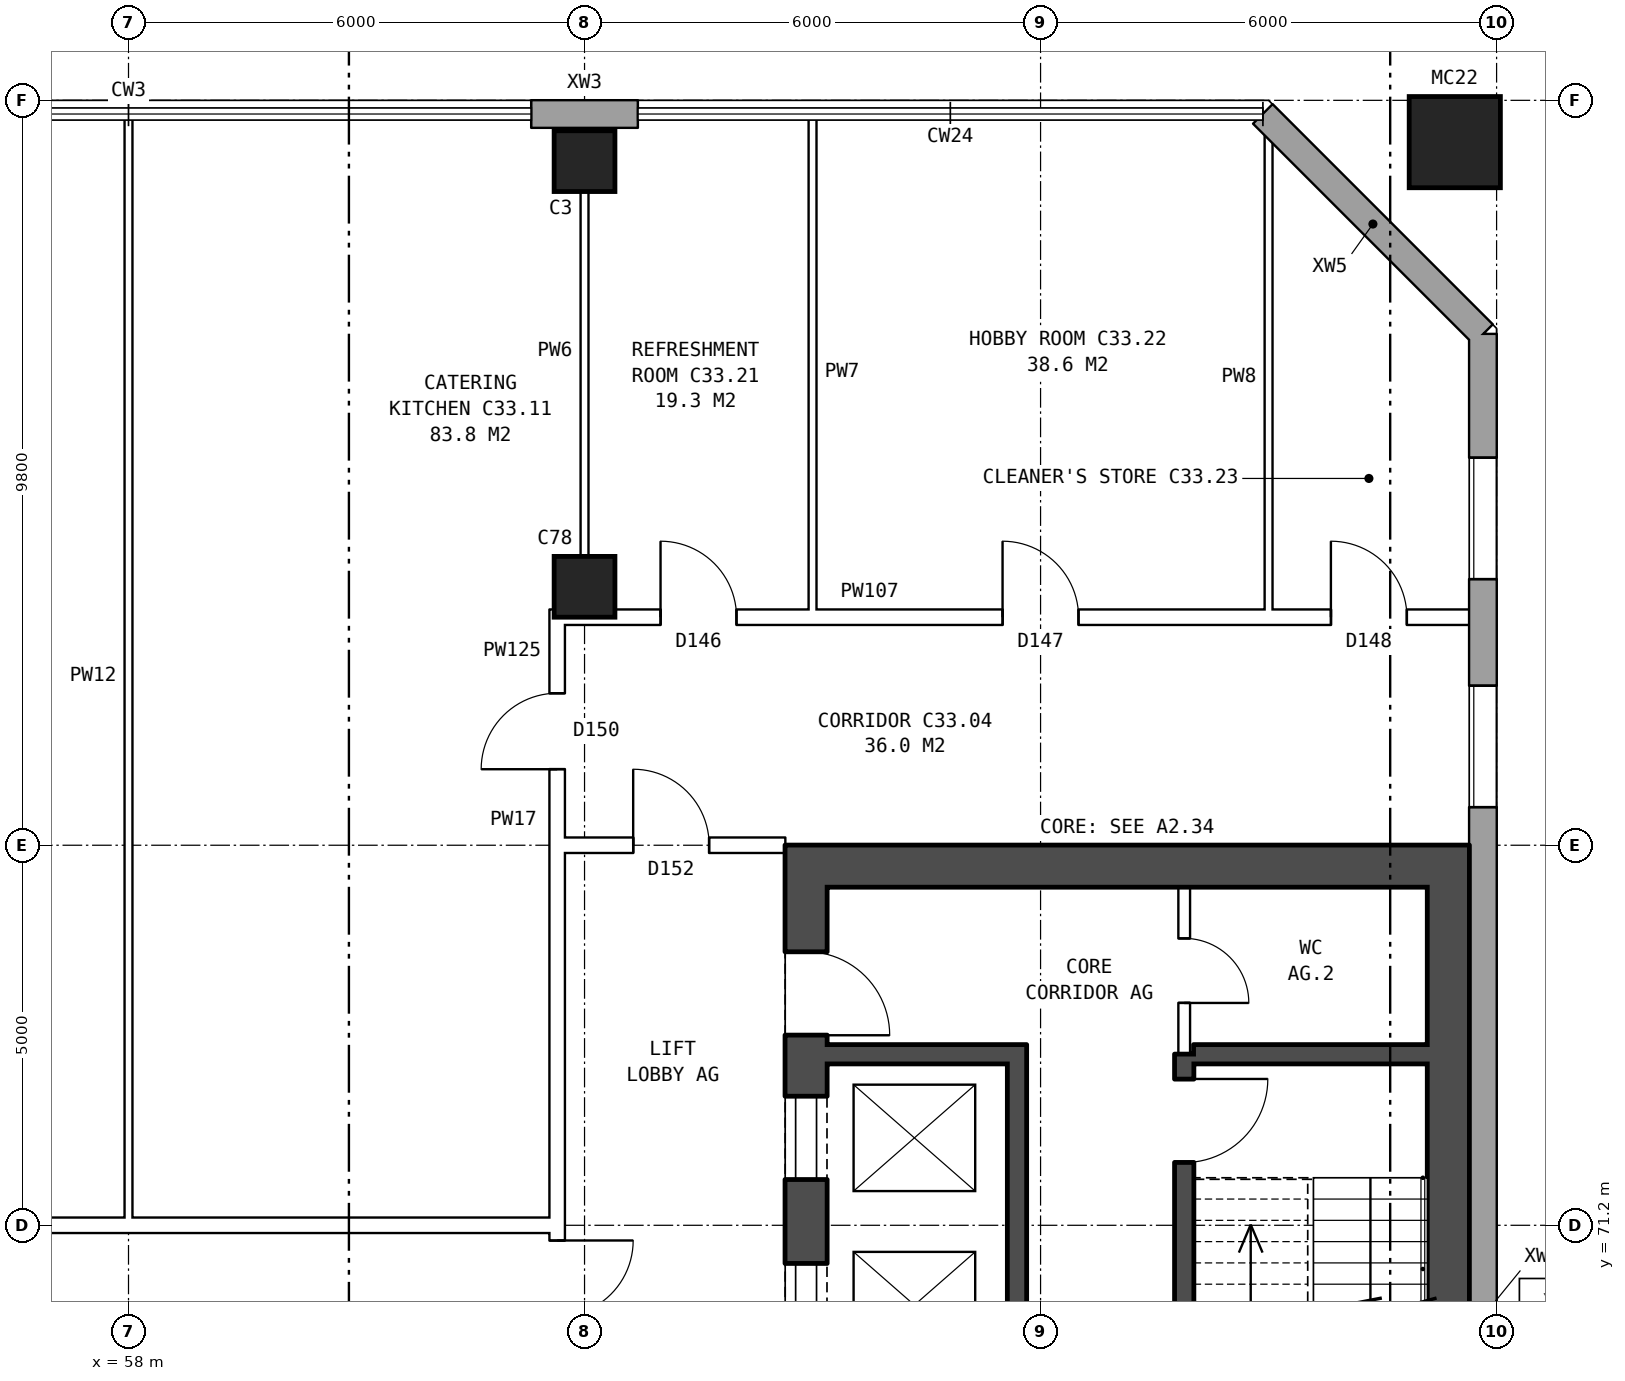
"""IFC4 building model, lengths in metres.
Left out: names, types, materials, properties, quantities, classifications, styles, units other than length and angle.
Written with IfcOpenShell. Run it as: python <this file> out.ifc"""

import sys

from ifc_helpers import new_model, si_unit, direction, frame, frame_2d, origin, origin_2d, place, context, subcontext, project, spatial, rectangle, hollow_rectangle, extrude, element, fill, save


model = new_model("IFC4")
c1 = context("Model", 3, precision=1e-05, world=origin(), true_north=direction((0.0, 1.0)))
c2 = subcontext(c1, "Body", "Model", "MODEL_VIEW")
j1 = project(units=[si_unit("LENGTHUNIT", "METRE"), si_unit("PLANEANGLEUNIT", "RADIAN")], contexts=[c1])
p1 = place(None, origin())
s1 = spatial("IfcSite", under=j1, at=p1, CompositionType="ELEMENT")
p2 = place(p1, origin())
s2 = spatial("IfcBuilding", under=s1, at=p2, CompositionType="ELEMENT")
p3 = place(p2, frame((0.0, 0.0, 119.5)))
s3 = spatial("IfcBuildingStorey", under=s2, at=p3, CompositionType="ELEMENT", Elevation=119.5)
for number, where, z_axis, x_axis in (
    (1, (64.0, 79.6, 0.0), (0.0, 0.0, 1.0), (1.0, 0.0, 0.0)),
    (2, (64.0, 85.2, 0.0), (0.0, 0.0, 1.0), (1.0, 0.0, 0.0)),
):
    element("IfcColumn", number, at=place(p3, frame(where, z_axis=z_axis, x_axis=x_axis)), inside=s3, PredefinedType="COLUMN", context=c2, shape_type="SweptSolid", body=[
        extrude(rectangle(XDim=0.8, YDim=0.8, at=origin_2d()), origin(), (0.0, 0.0, 1.0), 3.6),
    ])
p4 = place(p3, frame((75.45, 85.45, 0.0), z_axis=(0.0, 0.0, 1.0), x_axis=(1.0, 0.0, 0.0)))
e3 = element("IfcColumn", 3, at=p4, inside=s3, PredefinedType="COLUMN", context=c2, shape_type="SweptSolid", body=[
    extrude(hollow_rectangle(XDim=1.2, YDim=1.2, WallThickness=0.065, at=origin_2d()), origin(), (0.0, 0.0, 1.0), 4.2),
])
p5 = place(p3, frame((75.82, 57.075, 0.0), z_axis=(0.0, 0.0, 1.0), x_axis=(0.0, 1.0, 0.0)))
e4 = element("IfcWall", 4, at=p5, inside=s3, PredefinedType="STANDARD", context=c2, shape_type="SweptSolid", body=[
    extrude(rectangle(XDim=25.851, YDim=0.36, at=frame_2d((12.925, 0.0))), origin(), (0.0, 0.0, 1.0), 3.6),
])
p6 = place(p5, frame((1.625, 0.0, 0.8)))
e5 = element("IfcOpeningElement", 5, at=p6, cuts=e4, PredefinedType="OPENING", context=c2, shape_type="SweptSolid", body=[
    extrude(rectangle(XDim=1.6, YDim=1.8, at=frame_2d((0.8, 0.9))), frame((0.0, 0.19, 0.0), z_axis=(0.0, -1.0, 0.0), x_axis=(1.0, 0.0, 0.0)), (0.0, 0.0, 1.0), 0.38),
])
p7 = place(p5, frame((4.625, 0.0, 0.8)))
e6 = element("IfcOpeningElement", 6, at=p7, cuts=e4, PredefinedType="OPENING", context=c2, shape_type="SweptSolid", body=[
    extrude(rectangle(XDim=1.6, YDim=1.8, at=frame_2d((0.8, 0.9))), frame((0.0, 0.19, 0.0), z_axis=(0.0, -1.0, 0.0), x_axis=(1.0, 0.0, 0.0)), (0.0, 0.0, 1.0), 0.38),
])
p8 = place(p5, frame((19.625, 0.0, 0.8)))
e7 = element("IfcOpeningElement", 7, at=p8, cuts=e4, PredefinedType="OPENING", context=c2, shape_type="SweptSolid", body=[
    extrude(rectangle(XDim=1.6, YDim=1.8, at=frame_2d((0.8, 0.9))), frame((0.0, 0.19, 0.0), z_axis=(0.0, -1.0, 0.0), x_axis=(1.0, 0.0, 0.0)), (0.0, 0.0, 1.0), 0.38),
])
p9 = place(p5, frame((22.625, 0.0, 0.8)))
e8 = element("IfcOpeningElement", 8, at=p9, cuts=e4, PredefinedType="OPENING", context=c2, shape_type="SweptSolid", body=[
    extrude(rectangle(XDim=1.6, YDim=1.8, at=frame_2d((0.8, 0.9))), frame((0.0, 0.19, 0.0), z_axis=(0.0, -1.0, 0.0), x_axis=(1.0, 0.0, 0.0)), (0.0, 0.0, 1.0), 0.38),
])
p10 = place(p3, frame((75.82, 82.925, 0.0), z_axis=(0.0, 0.0, 1.0), x_axis=(-0.707106781187, 0.707106781187, 0.0)))
e9 = element("IfcWall", 9, at=p10, inside=s3, PredefinedType="STANDARD", context=c2, shape_type="SweptSolid", body=[
    extrude(rectangle(XDim=4.094, YDim=0.36, at=frame_2d((2.047, 0.0))), origin(), (0.0, 0.0, 1.0), 3.6),
])
p11 = place(p3, frame((64.7, 85.82, 0.0), z_axis=(0.0, 0.0, 1.0), x_axis=(-1.0, 0.0, 0.0)))
e10 = element("IfcWall", 10, at=p11, inside=s3, PredefinedType="STANDARD", context=c2, shape_type="SweptSolid", body=[
    extrude(rectangle(XDim=1.4, YDim=0.36, at=frame_2d((0.7, 0.0))), origin(), (0.0, 0.0, 1.0), 3.6),
])
p12 = place(p3, frame((66.915, 63.8, 0.0), z_axis=(0.0, 0.0, 1.0), x_axis=(0.0, 1.0, 0.0)))
e11 = element("IfcWall", 11, at=p12, inside=s3, PredefinedType="SHEAR", context=c2, shape_type="SweptSolid", body=[
    extrude(rectangle(XDim=12.4, YDim=0.55, at=frame_2d((6.2, 0.0))), origin(), (0.0, 0.0, 1.0), 3.6),
])
p13 = place(p12, frame((1.325, 0.0, 0.0)))
e12 = element("IfcOpeningElement", 12, at=p13, cuts=e11, PredefinedType="OPENING", context=c2, shape_type="SweptSolid", body=[
    extrude(rectangle(XDim=1.1, YDim=2.1, at=frame_2d((0.55, 1.05))), frame((0.0, 0.285, 0.0), z_axis=(0.0, -1.0, 0.0), x_axis=(1.0, 0.0, 0.0)), (0.0, 0.0, 1.0), 0.57),
])
p14 = place(p12, frame((3.6, 0.0, 0.0)))
e13 = element("IfcOpeningElement", 13, at=p14, cuts=e11, PredefinedType="OPENING", context=c2, shape_type="SweptSolid", body=[
    extrude(rectangle(XDim=1.1, YDim=2.1, at=frame_2d((0.55, 1.05))), frame((0.0, 0.285, 0.0), z_axis=(0.0, -1.0, 0.0), x_axis=(1.0, 0.0, 0.0)), (0.0, 0.0, 1.0), 0.57),
])
p15 = place(p12, frame((5.8, 0.0, 0.0)))
e14 = element("IfcOpeningElement", 14, at=p15, cuts=e11, PredefinedType="OPENING", context=c2, shape_type="SweptSolid", body=[
    extrude(rectangle(XDim=1.1, YDim=2.1, at=frame_2d((0.55, 1.05))), frame((0.0, 0.285, 0.0), z_axis=(0.0, -1.0, 0.0), x_axis=(1.0, 0.0, 0.0)), (0.0, 0.0, 1.0), 0.57),
])
p16 = place(p12, frame((8.0, 0.0, 0.0)))
e15 = element("IfcOpeningElement", 15, at=p16, cuts=e11, PredefinedType="OPENING", context=c2, shape_type="SweptSolid", body=[
    extrude(rectangle(XDim=1.1, YDim=2.1, at=frame_2d((0.55, 1.05))), frame((0.0, 0.285, 0.0), z_axis=(0.0, -1.0, 0.0), x_axis=(1.0, 0.0, 0.0)), (0.0, 0.0, 1.0), 0.57),
])
p17 = place(p12, frame((9.9, 0.0, 0.0)))
e16 = element("IfcOpeningElement", 16, at=p17, cuts=e11, PredefinedType="OPENING", context=c2, shape_type="SweptSolid", body=[
    extrude(rectangle(XDim=1.1, YDim=2.1, at=frame_2d((0.55, 1.05))), frame((0.0, 0.285, 0.0), z_axis=(0.0, -1.0, 0.0), x_axis=(1.0, 0.0, 0.0)), (0.0, 0.0, 1.0), 0.57),
])
p18 = place(p3, frame((75.365, 63.8, 0.0), z_axis=(0.0, 0.0, 1.0), x_axis=(0.0, 1.0, 0.0)))
e17 = element("IfcWall", 17, at=p18, inside=s3, PredefinedType="SHEAR", context=c2, shape_type="SweptSolid", body=[
    extrude(rectangle(XDim=12.4, YDim=0.55, at=frame_2d((6.2, 0.0))), origin(), (0.0, 0.0, 1.0), 3.6),
])
p19 = place(p3, frame((67.19, 75.925, 0.0), z_axis=(0.0, 0.0, 1.0), x_axis=(1.0, 0.0, 0.0)))
e18 = element("IfcWall", 18, at=p19, inside=s3, PredefinedType="SHEAR", context=c2, shape_type="SweptSolid", body=[
    extrude(rectangle(XDim=7.9, YDim=0.55, at=frame_2d((3.95, 0.0))), origin(), (0.0, 0.0, 1.0), 3.6),
])
p20 = place(p3, frame((67.19, 73.45, 0.0), z_axis=(0.0, 0.0, 1.0), x_axis=(1.0, 0.0, 0.0)))
e19 = element("IfcWall", 19, at=p20, inside=s3, PredefinedType="SHEAR", context=c2, shape_type="SweptSolid", body=[
    extrude(rectangle(XDim=2.375, YDim=0.25, at=frame_2d((1.188, 0.0))), origin(), (0.0, 0.0, 1.0), 3.6),
])
p21 = place(p3, frame((72.015, 73.45, 0.0), z_axis=(0.0, 0.0, 1.0), x_axis=(1.0, 0.0, 0.0)))
e20 = element("IfcWall", 20, at=p21, inside=s3, PredefinedType="SHEAR", context=c2, shape_type="SweptSolid", body=[
    extrude(rectangle(XDim=3.075, YDim=0.25, at=frame_2d((1.538, 0.0))), origin(), (0.0, 0.0, 1.0), 3.6),
])
p22 = place(p3, frame((69.69, 66.975, 0.0), z_axis=(0.0, 0.0, 1.0), x_axis=(0.0, 1.0, 0.0)))
e21 = element("IfcWall", 21, at=p22, inside=s3, PredefinedType="SHEAR", context=c2, shape_type="SweptSolid", body=[
    extrude(rectangle(XDim=6.6, YDim=0.25, at=frame_2d((3.3, 0.0))), origin(), (0.0, 0.0, 1.0), 3.6),
])
p23 = place(p3, frame((71.89, 66.225, 0.0), z_axis=(0.0, 0.0, 1.0), x_axis=(0.0, 1.0, 0.0)))
e22 = element("IfcWall", 22, at=p23, inside=s3, PredefinedType="SHEAR", context=c2, shape_type="SweptSolid", body=[
    extrude(rectangle(XDim=7.225, YDim=0.25, at=frame_2d((3.612, 0.0))), origin(), (0.0, 0.0, 1.0), 3.6),
])
p24 = place(p23, frame((5.8, 0.0, 0.0)))
e23 = element("IfcOpeningElement", 23, at=p24, cuts=e22, PredefinedType="OPENING", context=c2, shape_type="SweptSolid", body=[
    extrude(rectangle(XDim=1.1, YDim=2.1, at=frame_2d((0.55, 1.05))), frame((0.0, 0.135, 0.0), z_axis=(0.0, -1.0, 0.0), x_axis=(1.0, 0.0, 0.0)), (0.0, 0.0, 1.0), 0.27),
])
p25 = place(p3, frame((71.89, 73.45, 0.0), z_axis=(0.0, 0.0, 1.0), x_axis=(0.0, 1.0, 0.0)))
e24 = element("IfcWall", 24, at=p25, inside=s3, PredefinedType="PARTITIONING", context=c2, shape_type="SweptSolid", body=[
    extrude(rectangle(XDim=2.2, YDim=0.15, at=frame_2d((1.1, 0.0))), origin(), (0.0, 0.0, 1.0), 3.6),
])
p26 = place(p25, frame((0.675, 0.0, 0.0)))
e25 = element("IfcOpeningElement", 25, at=p26, cuts=e24, PredefinedType="OPENING", context=c2, shape_type="SweptSolid", body=[
    extrude(rectangle(XDim=0.85, YDim=2.1, at=frame_2d((0.425, 1.05))), frame((0.0, 0.085, 0.0), z_axis=(0.0, -1.0, 0.0), x_axis=(1.0, 0.0, 0.0)), (0.0, 0.0, 1.0), 0.17),
])
p27 = place(p3, frame((63.64, 63.9, 0.0), z_axis=(0.0, 0.0, 1.0), x_axis=(0.0, 1.0, 0.0)))
e26 = element("IfcWall", 26, at=p27, inside=s3, PredefinedType="PARTITIONING", context=c2, shape_type="SweptSolid", body=[
    extrude(rectangle(XDim=12.2, YDim=0.2, at=frame_2d((6.1, 0.0))), origin(), (0.0, 0.0, 1.0), 3.6),
])
p28 = place(p27, frame((5.1, 0.0, 0.0)))
e27 = element("IfcOpeningElement", 27, at=p28, cuts=e26, PredefinedType="OPENING", context=c2, shape_type="SweptSolid", body=[
    extrude(rectangle(XDim=2.0, YDim=2.1, at=frame_2d((1.0, 1.05))), frame((0.0, 0.11, 0.0), z_axis=(0.0, -1.0, 0.0), x_axis=(1.0, 0.0, 0.0)), (0.0, 0.0, 1.0), 0.22),
])
p29 = place(p3, frame((44.36, 71.2, 0.0), z_axis=(0.0, 0.0, 1.0), x_axis=(1.0, 0.0, 0.0)))
e28 = element("IfcWall", 28, at=p29, inside=s3, PredefinedType="PARTITIONING", context=c2, shape_type="SweptSolid", body=[
    extrude(rectangle(XDim=19.28, YDim=0.2, at=frame_2d((9.64, 0.0))), origin(), (0.0, 0.0, 1.0), 3.6),
])
p30 = place(p29, frame((9.14, 0.0, 0.0)))
e29 = element("IfcOpeningElement", 29, at=p30, cuts=e28, PredefinedType="OPENING", context=c2, shape_type="SweptSolid", body=[
    extrude(rectangle(XDim=1.0, YDim=2.1, at=frame_2d((0.5, 1.05))), frame((0.0, 0.11, 0.0), z_axis=(0.0, -1.0, 0.0), x_axis=(1.0, 0.0, 0.0)), (0.0, 0.0, 1.0), 0.22),
])
p31 = place(p3, frame((63.54, 76.2, 0.0), z_axis=(0.0, 0.0, 1.0), x_axis=(1.0, 0.0, 0.0)))
e30 = element("IfcWall", 30, at=p31, inside=s3, PredefinedType="PARTITIONING", context=c2, shape_type="SweptSolid", body=[
    extrude(rectangle(XDim=3.1, YDim=0.2, at=frame_2d((1.55, 0.0))), origin(), (0.0, 0.0, 1.0), 3.6),
])
p32 = place(p31, frame((1.1, 0.0, 0.0)))
e31 = element("IfcOpeningElement", 31, at=p32, cuts=e30, PredefinedType="OPENING", context=c2, shape_type="SweptSolid", body=[
    extrude(rectangle(XDim=1.0, YDim=2.1, at=frame_2d((0.5, 1.05))), frame((0.0, 0.11, 0.0), z_axis=(0.0, -1.0, 0.0), x_axis=(1.0, 0.0, 0.0)), (0.0, 0.0, 1.0), 0.22),
])
p33 = place(p3, frame((63.54, 79.2, 0.0), z_axis=(0.0, 0.0, 1.0), x_axis=(1.0, 0.0, 0.0)))
e32 = element("IfcWall", 32, at=p33, inside=s3, PredefinedType="PARTITIONING", context=c2, shape_type="SweptSolid", body=[
    extrude(rectangle(XDim=12.22, YDim=0.2, at=frame_2d((6.11, 0.0))), origin(), (0.0, 0.0, 1.0), 3.6),
])
p34 = place(p33, frame((1.46, 0.0, 0.0)))
e33 = element("IfcOpeningElement", 33, at=p34, cuts=e32, PredefinedType="OPENING", context=c2, shape_type="SweptSolid", body=[
    extrude(rectangle(XDim=1.0, YDim=2.1, at=frame_2d((0.5, 1.05))), frame((0.0, 0.11, 0.0), z_axis=(0.0, -1.0, 0.0), x_axis=(1.0, 0.0, 0.0)), (0.0, 0.0, 1.0), 0.22),
])
p35 = place(p33, frame((5.96, 0.0, 0.0)))
e34 = element("IfcOpeningElement", 34, at=p35, cuts=e32, PredefinedType="OPENING", context=c2, shape_type="SweptSolid", body=[
    extrude(rectangle(XDim=1.0, YDim=2.1, at=frame_2d((0.5, 1.05))), frame((0.0, 0.11, 0.0), z_axis=(0.0, -1.0, 0.0), x_axis=(1.0, 0.0, 0.0)), (0.0, 0.0, 1.0), 0.22),
])
p36 = place(p33, frame((10.28, 0.0, 0.0)))
e35 = element("IfcOpeningElement", 35, at=p36, cuts=e32, PredefinedType="OPENING", context=c2, shape_type="SweptSolid", body=[
    extrude(rectangle(XDim=1.0, YDim=2.1, at=frame_2d((0.5, 1.05))), frame((0.0, 0.11, 0.0), z_axis=(0.0, -1.0, 0.0), x_axis=(1.0, 0.0, 0.0)), (0.0, 0.0, 1.0), 0.22),
])
p37 = place(p3, frame((58.0, 71.1, 0.0), z_axis=(0.0, 0.0, 1.0), x_axis=(0.0, 1.0, 0.0)))
e36 = element("IfcWall", 36, at=p37, inside=s3, PredefinedType="PARTITIONING", context=c2, shape_type="SweptSolid", body=[
    extrude(rectangle(XDim=14.66, YDim=0.1, at=frame_2d((7.33, 0.0))), origin(), (0.0, 0.0, 1.0), 3.6),
])
p38 = place(p3, frame((63.64, 76.1, 0.0), z_axis=(0.0, 0.0, 1.0), x_axis=(0.0, 1.0, 0.0)))
e37 = element("IfcWall", 37, at=p38, inside=s3, PredefinedType="PARTITIONING", context=c2, shape_type="SweptSolid", body=[
    extrude(rectangle(XDim=3.2, YDim=0.2, at=frame_2d((1.6, 0.0))), origin(), (0.0, 0.0, 1.0), 3.6),
])
p39 = place(p38, frame((1.1, 0.0, 0.0)))
e38 = element("IfcOpeningElement", 38, at=p39, cuts=e37, PredefinedType="OPENING", context=c2, shape_type="SweptSolid", body=[
    extrude(rectangle(XDim=1.0, YDim=2.1, at=frame_2d((0.5, 1.05))), frame((0.0, 0.11, 0.0), z_axis=(0.0, -1.0, 0.0), x_axis=(1.0, 0.0, 0.0)), (0.0, 0.0, 1.0), 0.22),
])
for number, where, z_axis, x_axis in (
    (39, (64.0, 79.1, 0.0), (0.0, 0.0, 1.0), (0.0, 1.0, 0.0)),
    (40, (67.0, 79.1, 0.0), (0.0, 0.0, 1.0), (0.0, 1.0, 0.0)),
):
    element("IfcWall", number, at=place(p3, frame(where, z_axis=z_axis, x_axis=x_axis)), inside=s3, PredefinedType="PARTITIONING", context=c2, shape_type="SweptSolid", body=[
        extrude(rectangle(XDim=6.66, YDim=0.1, at=frame_2d((3.33, 0.0))), origin(), (0.0, 0.0, 1.0), 3.6),
    ])
p40 = place(p3, frame((73.0, 79.1, 0.0), z_axis=(0.0, 0.0, 1.0), x_axis=(0.0, 1.0, 0.0)))
e41 = element("IfcWall", 41, at=p40, inside=s3, PredefinedType="PARTITIONING", context=c2, shape_type="SweptSolid", body=[
    extrude(rectangle(XDim=6.511, YDim=0.1, at=frame_2d((3.255, 0.0))), origin(), (0.0, 0.0, 1.0), 3.6),
])
p41 = place(p8, origin())
e42 = element("IfcWindow", 42, at=p41, inside=s3, PartitioningType="SINGLE_PANEL", PredefinedType="WINDOW", context=c2, shape_type="SweptSolid", body=[
    extrude(rectangle(XDim=1.6, YDim=1.8, at=frame_2d((0.8, 0.9))), frame((0.0, 0.15, 0.0), z_axis=(0.0, -1.0, 0.0), x_axis=(1.0, 0.0, 0.0)), (0.0, 0.0, 1.0), 0.06),
])
fill(e7, e42)
p42 = place(p9, origin())
e43 = element("IfcWindow", 43, at=p42, inside=s3, PartitioningType="SINGLE_PANEL", PredefinedType="WINDOW", context=c2, shape_type="SweptSolid", body=[
    extrude(rectangle(XDim=1.6, YDim=1.8, at=frame_2d((0.8, 0.9))), frame((0.0, 0.15, 0.0), z_axis=(0.0, -1.0, 0.0), x_axis=(1.0, 0.0, 0.0)), (0.0, 0.0, 1.0), 0.06),
])
fill(e8, e43)
p43 = place(p15, origin())
e44 = element("IfcDoor", 44, at=p43, inside=s3, OperationType="DOUBLE_DOOR_SLIDING", PredefinedType="DOOR", context=c2, shape_type="SweptSolid", body=[
    extrude(rectangle(XDim=1.1, YDim=2.1, at=frame_2d((0.55, 1.05))), frame((0.0, -0.21, 0.0), z_axis=(0.0, -1.0, 0.0), x_axis=(1.0, 0.0, 0.0)), (0.0, 0.0, 1.0), 0.05),
])
fill(e14, e44)
p44 = place(p16, origin())
e45 = element("IfcDoor", 45, at=p44, inside=s3, OperationType="DOUBLE_DOOR_SLIDING", PredefinedType="DOOR", context=c2, shape_type="SweptSolid", body=[
    extrude(rectangle(XDim=1.1, YDim=2.1, at=frame_2d((0.55, 1.05))), frame((0.0, -0.21, 0.0), z_axis=(0.0, -1.0, 0.0), x_axis=(1.0, 0.0, 0.0)), (0.0, 0.0, 1.0), 0.05),
])
fill(e15, e45)
p45 = place(p17, frame((1.1, 0.0, 0.0), z_axis=(0.0, 0.0, 1.0), x_axis=(-1.0, 0.0, 0.0)))
e46 = element("IfcDoor", 46, at=p45, inside=s3, OperationType="SINGLE_SWING_RIGHT", PredefinedType="DOOR", context=c2, shape_type="SweptSolid", body=[
    extrude(rectangle(XDim=1.1, YDim=2.1, at=frame_2d((0.55, 1.05))), frame((0.0, 0.26, 0.0), z_axis=(0.0, -1.0, 0.0), x_axis=(1.0, 0.0, 0.0)), (0.0, 0.0, 1.0), 0.05),
])
fill(e16, e46)
p46 = place(p24, frame((1.1, 0.0, 0.0), z_axis=(0.0, 0.0, 1.0), x_axis=(-1.0, 0.0, 0.0)))
e47 = element("IfcDoor", 47, at=p46, inside=s3, OperationType="SINGLE_SWING_LEFT", PredefinedType="DOOR", context=c2, shape_type="SweptSolid", body=[
    extrude(rectangle(XDim=1.1, YDim=2.1, at=frame_2d((0.55, 1.05))), frame((0.0, 0.025, 0.0), z_axis=(0.0, -1.0, 0.0), x_axis=(1.0, 0.0, 0.0)), (0.0, 0.0, 1.0), 0.05),
])
fill(e23, e47)
p47 = place(p26, frame((0.85, 0.0, 0.0), z_axis=(0.0, 0.0, 1.0), x_axis=(-1.0, 0.0, 0.0)))
e48 = element("IfcDoor", 48, at=p47, inside=s3, OperationType="SINGLE_SWING_RIGHT", PredefinedType="DOOR", context=c2, shape_type="SweptSolid", body=[
    extrude(rectangle(XDim=0.85, YDim=2.1, at=frame_2d((0.425, 1.05))), frame((0.0, 0.025, 0.0), z_axis=(0.0, -1.0, 0.0), x_axis=(1.0, 0.0, 0.0)), (0.0, 0.0, 1.0), 0.05),
])
fill(e25, e48)
p48 = place(p28, frame((2.0, 0.0, 0.0), z_axis=(0.0, 0.0, 1.0), x_axis=(-1.0, 0.0, 0.0)))
e49 = element("IfcDoor", 49, at=p48, inside=s3, OperationType="DOUBLE_DOOR_SINGLE_SWING", PredefinedType="DOOR", context=c2, shape_type="SweptSolid", body=[
    extrude(rectangle(XDim=2.0, YDim=2.1, at=frame_2d((1.0, 1.05))), frame((0.0, 0.025, 0.0), z_axis=(0.0, -1.0, 0.0), x_axis=(1.0, 0.0, 0.0)), (0.0, 0.0, 1.0), 0.05),
])
fill(e27, e49)
p49 = place(p32, origin())
e50 = element("IfcDoor", 50, at=p49, inside=s3, OperationType="SINGLE_SWING_LEFT", PredefinedType="DOOR", context=c2, shape_type="SweptSolid", body=[
    extrude(rectangle(XDim=1.0, YDim=2.1, at=frame_2d((0.5, 1.05))), frame((0.0, 0.025, 0.0), z_axis=(0.0, -1.0, 0.0), x_axis=(1.0, 0.0, 0.0)), (0.0, 0.0, 1.0), 0.05),
])
fill(e31, e50)
p50 = place(p34, origin())
e51 = element("IfcDoor", 51, at=p50, inside=s3, OperationType="SINGLE_SWING_LEFT", PredefinedType="DOOR", context=c2, shape_type="SweptSolid", body=[
    extrude(rectangle(XDim=1.0, YDim=2.1, at=frame_2d((0.5, 1.05))), frame((0.0, 0.025, 0.0), z_axis=(0.0, -1.0, 0.0), x_axis=(1.0, 0.0, 0.0)), (0.0, 0.0, 1.0), 0.05),
])
fill(e33, e51)
p51 = place(p35, origin())
e52 = element("IfcDoor", 52, at=p51, inside=s3, OperationType="SINGLE_SWING_LEFT", PredefinedType="DOOR", context=c2, shape_type="SweptSolid", body=[
    extrude(rectangle(XDim=1.0, YDim=2.1, at=frame_2d((0.5, 1.05))), frame((0.0, 0.025, 0.0), z_axis=(0.0, -1.0, 0.0), x_axis=(1.0, 0.0, 0.0)), (0.0, 0.0, 1.0), 0.05),
])
fill(e34, e52)
p52 = place(p36, origin())
e53 = element("IfcDoor", 53, at=p52, inside=s3, OperationType="SINGLE_SWING_LEFT", PredefinedType="DOOR", context=c2, shape_type="SweptSolid", body=[
    extrude(rectangle(XDim=1.0, YDim=2.1, at=frame_2d((0.5, 1.05))), frame((0.0, 0.025, 0.0), z_axis=(0.0, -1.0, 0.0), x_axis=(1.0, 0.0, 0.0)), (0.0, 0.0, 1.0), 0.05),
])
fill(e35, e53)
p53 = place(p39, origin())
e54 = element("IfcDoor", 54, at=p53, inside=s3, OperationType="SINGLE_SWING_LEFT", PredefinedType="DOOR", context=c2, shape_type="SweptSolid", body=[
    extrude(rectangle(XDim=1.0, YDim=2.1, at=frame_2d((0.5, 1.05))), frame((0.0, 0.025, 0.0), z_axis=(0.0, -1.0, 0.0), x_axis=(1.0, 0.0, 0.0)), (0.0, 0.0, 1.0), 0.05),
])
fill(e38, e54)
save(model, sys.argv[1])
